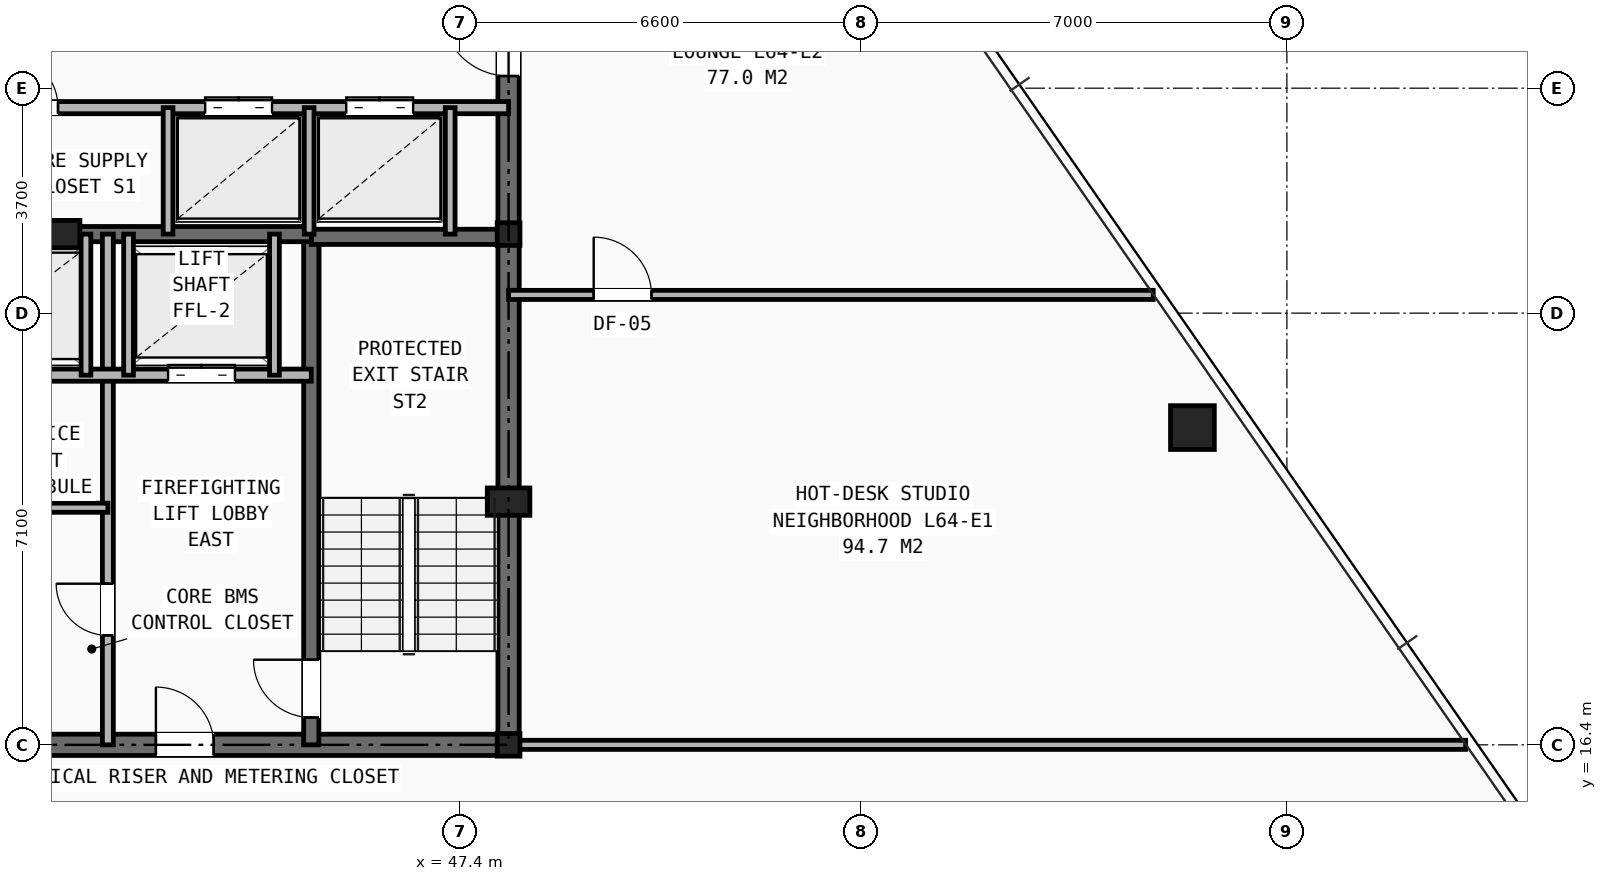
"""IFC4 building model, lengths in metres.
Left out: names, types, materials, properties, quantities, classifications, styles, units other than length and angle.
Written with IfcOpenShell. Run it as: python <this file> out.ifc"""

import sys

from ifc_helpers import new_model, si_unit, direction, frame, frame_2d, origin, origin_2d, place, context, subcontext, project, spatial, rectangle, hollow_rectangle, i_section, extrude, element, fill, save


model = new_model("IFC4")
c1 = context("Model", 3, precision=1e-05, world=origin(), true_north=direction((0.0, 1.0)))
c2 = subcontext(c1, "Body", "Model", "MODEL_VIEW")
j1 = project(units=[si_unit("LENGTHUNIT", "METRE"), si_unit("PLANEANGLEUNIT", "RADIAN")], contexts=[c1])
p1 = place(None, origin())
s1 = spatial("IfcSite", under=j1, at=p1, CompositionType="ELEMENT")
p2 = place(p1, origin())
s2 = spatial("IfcBuilding", under=s1, at=p2, CompositionType="ELEMENT")
p3 = place(p2, frame((0.0, 0.0, 225.9)))
s3 = spatial("IfcBuildingStorey", under=s2, at=p3, CompositionType="ELEMENT", Elevation=225.9)
for number, where, z_axis, x_axis in (
    (1, (48.2, 16.4, 0.0), (0.0, 0.0, 1.0), (1.0, 0.0, 0.0)),
    (2, (48.2, 24.8, 0.0), (0.0, 0.0, 1.0), (1.0, 0.0, 0.0)),
):
    element("IfcColumn", number, at=place(p3, frame(where, z_axis=z_axis, x_axis=x_axis)), inside=s3, PredefinedType="COLUMN", context=c2, shape_type="SweptSolid", body=[
        extrude(i_section(OverallWidth=0.374, OverallDepth=0.372, WebThickness=0.016, FlangeThickness=0.026, at=origin_2d()), origin(), (0.0, 0.0, 1.0), 3.5),
    ])
for number, where, z_axis, x_axis in (
    (3, (48.2, 20.4, 0.0), (0.0, 0.0, 1.0), (1.0, 0.0, 0.0)),
    (4, (40.8, 24.8, 0.0), (0.0, 0.0, 1.0), (1.0, 0.0, 0.0)),
):
    element("IfcColumn", number, at=place(p3, frame(where, z_axis=z_axis, x_axis=x_axis)), inside=s3, PredefinedType="PILASTER", context=c2, shape_type="SweptSolid", body=[
        extrude(rectangle(XDim=0.7, YDim=0.45, at=origin_2d()), origin(), (0.0, 0.0, 1.0), 3.5),
    ])
p4 = place(p3, frame((59.447, 21.618, 0.0), z_axis=(0.0, 0.0, 1.0), x_axis=(1.0, 0.0, 0.0)))
e5 = element("IfcColumn", 5, at=p4, inside=s3, PredefinedType="COLUMN", context=c2, shape_type="SweptSolid", body=[
    extrude(hollow_rectangle(XDim=0.72, YDim=0.72, WallThickness=0.05, at=origin_2d()), origin(), (0.0, 0.0, 1.0), 3.5),
])
p5 = place(p3, frame((31.8, 16.4, 0.0), z_axis=(0.0, 0.0, 1.0), x_axis=(1.0, 0.0, 0.0)))
e6 = element("IfcWall", 6, at=p5, inside=s3, PredefinedType="SHEAR", context=c2, shape_type="SweptSolid", body=[
    extrude(rectangle(XDim=16.4, YDim=0.35, at=frame_2d((8.2, 0.0))), origin(), (0.0, 0.0, 1.0), 3.25),
])
p6 = place(p5, frame((4.2, 0.0, 0.0)))
e7 = element("IfcOpeningElement", 7, at=p6, cuts=e6, PredefinedType="OPENING", context=c2, shape_type="SweptSolid", body=[
    extrude(rectangle(XDim=0.95, YDim=2.1, at=frame_2d((0.475, 1.05))), frame((0.0, 0.185, 0.0), z_axis=(0.0, -1.0, 0.0), x_axis=(1.0, 0.0, 0.0)), (0.0, 0.0, 1.0), 0.37),
])
p7 = place(p5, frame((10.6, 0.0, 0.0)))
e8 = element("IfcOpeningElement", 8, at=p7, cuts=e6, PredefinedType="OPENING", context=c2, shape_type="SweptSolid", body=[
    extrude(rectangle(XDim=0.95, YDim=2.1, at=frame_2d((0.475, 1.05))), frame((0.0, 0.185, 0.0), z_axis=(0.0, -1.0, 0.0), x_axis=(1.0, 0.0, 0.0)), (0.0, 0.0, 1.0), 0.37),
])
p8 = place(p3, frame((48.2, 16.4, 0.0), z_axis=(0.0, 0.0, 1.0), x_axis=(0.0, 1.0, 0.0)))
e9 = element("IfcWall", 9, at=p8, inside=s3, PredefinedType="SHEAR", context=c2, shape_type="SweptSolid", body=[
    extrude(rectangle(XDim=14.8, YDim=0.35, at=frame_2d((7.4, 0.0))), origin(), (0.0, 0.0, 1.0), 3.25),
])
p9 = place(p8, frame((11.0, 0.0, 0.0)))
e10 = element("IfcOpeningElement", 10, at=p9, cuts=e9, PredefinedType="OPENING", context=c2, shape_type="SweptSolid", body=[
    extrude(rectangle(XDim=1.1, YDim=2.15, at=frame_2d((0.55, 1.075))), frame((0.0, 0.185, 0.0), z_axis=(0.0, -1.0, 0.0), x_axis=(1.0, 0.0, 0.0)), (0.0, 0.0, 1.0), 0.37),
])
p10 = place(p3, frame((44.955, 16.4, 0.0), z_axis=(0.0, 0.0, 1.0), x_axis=(0.0, 1.0, 0.0)))
e11 = element("IfcWall", 11, at=p10, inside=s3, PredefinedType="SHEAR", context=c2, shape_type="SweptSolid", body=[
    extrude(rectangle(XDim=8.4, YDim=0.25, at=frame_2d((4.2, 0.0))), origin(), (0.0, 0.0, 1.0), 3.25),
])
p11 = place(p10, frame((0.45, 0.0, 0.0)))
e12 = element("IfcOpeningElement", 12, at=p11, cuts=e11, PredefinedType="OPENING", context=c2, shape_type="SweptSolid", body=[
    extrude(rectangle(XDim=0.95, YDim=2.1, at=frame_2d((0.475, 1.05))), frame((0.0, 0.135, 0.0), z_axis=(0.0, -1.0, 0.0), x_axis=(1.0, 0.0, 0.0)), (0.0, 0.0, 1.0), 0.27),
])
p12 = place(p3, frame((44.955, 24.755, 0.0), z_axis=(0.0, 0.0, 1.0), x_axis=(1.0, 0.0, 0.0)))
e13 = element("IfcWall", 13, at=p12, inside=s3, PredefinedType="SHEAR", context=c2, shape_type="SweptSolid", body=[
    extrude(rectangle(XDim=3.245, YDim=0.25, at=frame_2d((1.623, 0.0))), origin(), (0.0, 0.0, 1.0), 3.25),
])
p13 = place(p3, frame((35.045, 24.8, 0.0), z_axis=(0.0, 0.0, 1.0), x_axis=(1.0, 0.0, 0.0)))
e14 = element("IfcWall", 14, at=p13, inside=s3, PredefinedType="SHEAR", context=c2, shape_type="SweptSolid", body=[
    extrude(rectangle(XDim=9.91, YDim=0.25, at=frame_2d((4.955, 0.0))), origin(), (0.0, 0.0, 1.0), 3.25),
])
p14 = place(p3, frame((41.61, 16.4, 0.0), z_axis=(0.0, 0.0, 1.0), x_axis=(0.0, 1.0, 0.0)))
e15 = element("IfcWall", 15, at=p14, inside=s3, PredefinedType="PARTITIONING", context=c2, shape_type="SweptSolid", body=[
    extrude(rectangle(XDim=8.4, YDim=0.18, at=frame_2d((4.2, 0.0))), origin(), (0.0, 0.0, 1.0), 2.705),
])
p15 = place(p14, frame((1.8, 0.0, 0.0)))
e16 = element("IfcOpeningElement", 16, at=p15, cuts=e15, PredefinedType="OPENING", context=c2, shape_type="SweptSolid", body=[
    extrude(rectangle(XDim=0.85, YDim=2.05, at=frame_2d((0.425, 1.025))), frame((0.0, 0.1, 0.0), z_axis=(0.0, -1.0, 0.0), x_axis=(1.0, 0.0, 0.0)), (0.0, 0.0, 1.0), 0.2),
])
p16 = place(p3, frame((35.045, 22.48, 0.0), z_axis=(0.0, 0.0, 1.0), x_axis=(1.0, 0.0, 0.0)))
e17 = element("IfcWall", 17, at=p16, inside=s3, PredefinedType="SOLIDWALL", context=c2, shape_type="SweptSolid", body=[
    extrude(rectangle(XDim=9.91, YDim=0.2, at=frame_2d((4.955, 0.0))), origin(), (0.0, 0.0, 1.0), 3.25),
])
p17 = place(p16, frame((1.255, 0.0, 0.0)))
e18 = element("IfcOpeningElement", 18, at=p17, cuts=e17, PredefinedType="OPENING", context=c2, shape_type="SweptSolid", body=[
    extrude(rectangle(XDim=1.1, YDim=2.15, at=frame_2d((0.55, 1.075))), frame((0.0, 0.11, 0.0), z_axis=(0.0, -1.0, 0.0), x_axis=(1.0, 0.0, 0.0)), (0.0, 0.0, 1.0), 0.22),
])
p18 = place(p16, frame((7.555, 0.0, 0.0)))
e19 = element("IfcOpeningElement", 19, at=p18, cuts=e17, PredefinedType="OPENING", context=c2, shape_type="SweptSolid", body=[
    extrude(rectangle(XDim=1.1, YDim=2.15, at=frame_2d((0.55, 1.075))), frame((0.0, 0.11, 0.0), z_axis=(0.0, -1.0, 0.0), x_axis=(1.0, 0.0, 0.0)), (0.0, 0.0, 1.0), 0.22),
])
p19 = place(p16, frame((4.405, 0.0, 0.0)))
e20 = element("IfcOpeningElement", 20, at=p19, cuts=e17, PredefinedType="OPENING", context=c2, shape_type="SweptSolid", body=[
    extrude(rectangle(XDim=1.1, YDim=2.15, at=frame_2d((0.55, 1.075))), frame((0.0, 0.11, 0.0), z_axis=(0.0, -1.0, 0.0), x_axis=(1.0, 0.0, 0.0)), (0.0, 0.0, 1.0), 0.22),
])
p20 = place(p3, frame((38.39, 20.3, 0.0), z_axis=(0.0, 0.0, 1.0), x_axis=(1.0, 0.0, 0.0)))
e21 = element("IfcWall", 21, at=p20, inside=s3, PredefinedType="PARTITIONING", context=c2, shape_type="SweptSolid", body=[
    extrude(rectangle(XDim=3.22, YDim=0.15, at=frame_2d((1.61, 0.0))), origin(), (0.0, 0.0, 1.0), 3.25),
])
for number, where, z_axis, x_axis in (
    (22, (41.95, 22.48, 0.0), (0.0, 0.0, 1.0), (0.0, 1.0, 0.0)),
    (23, (44.35, 22.48, 0.0), (0.0, 0.0, 1.0), (0.0, 1.0, 0.0)),
    (24, (41.25, 22.48, 0.0), (0.0, 0.0, 1.0), (0.0, 1.0, 0.0)),
):
    element("IfcWall", number, at=place(p3, frame(where, z_axis=z_axis, x_axis=x_axis)), inside=s3, PredefinedType="SOLIDWALL", context=c2, shape_type="SweptSolid", body=[
        extrude(rectangle(XDim=2.32, YDim=0.16, at=frame_2d((1.16, 0.0))), origin(), (0.0, 0.0, 1.0), 3.25),
    ])
p21 = place(p3, frame((33.82, 26.88, 0.0), z_axis=(0.0, 0.0, 1.0), x_axis=(1.0, 0.0, 0.0)))
e25 = element("IfcWall", 25, at=p21, inside=s3, PredefinedType="SOLIDWALL", context=c2, shape_type="SweptSolid", body=[
    extrude(rectangle(XDim=14.38, YDim=0.2, at=frame_2d((7.19, 0.0))), origin(), (0.0, 0.0, 1.0), 2.705),
])
p22 = place(p21, frame((1.78, 0.0, 0.0)))
e26 = element("IfcOpeningElement", 26, at=p22, cuts=e25, PredefinedType="OPENING", context=c2, shape_type="SweptSolid", body=[
    extrude(rectangle(XDim=0.9, YDim=2.1, at=frame_2d((0.45, 1.05))), frame((0.0, 0.11, 0.0), z_axis=(0.0, -1.0, 0.0), x_axis=(1.0, 0.0, 0.0)), (0.0, 0.0, 1.0), 0.22),
])
p23 = place(p21, frame((6.07, 0.0, 0.0)))
e27 = element("IfcOpeningElement", 27, at=p23, cuts=e25, PredefinedType="OPENING", context=c2, shape_type="SweptSolid", body=[
    extrude(rectangle(XDim=0.9, YDim=2.1, at=frame_2d((0.45, 1.05))), frame((0.0, 0.11, 0.0), z_axis=(0.0, -1.0, 0.0), x_axis=(1.0, 0.0, 0.0)), (0.0, 0.0, 1.0), 0.22),
])
p24 = place(p21, frame((9.39, 0.0, 0.0)))
e28 = element("IfcOpeningElement", 28, at=p24, cuts=e25, PredefinedType="OPENING", context=c2, shape_type="SweptSolid", body=[
    extrude(rectangle(XDim=1.1, YDim=2.15, at=frame_2d((0.55, 1.075))), frame((0.0, 0.11, 0.0), z_axis=(0.0, -1.0, 0.0), x_axis=(1.0, 0.0, 0.0)), (0.0, 0.0, 1.0), 0.22),
])
p25 = place(p21, frame((11.71, 0.0, 0.0)))
e29 = element("IfcOpeningElement", 29, at=p25, cuts=e25, PredefinedType="OPENING", context=c2, shape_type="SweptSolid", body=[
    extrude(rectangle(XDim=1.1, YDim=2.15, at=frame_2d((0.55, 1.075))), frame((0.0, 0.11, 0.0), z_axis=(0.0, -1.0, 0.0), x_axis=(1.0, 0.0, 0.0)), (0.0, 0.0, 1.0), 0.22),
])
for number, where, z_axis, x_axis in (
    (30, (42.6, 24.8, 0.0), (0.0, 0.0, 1.0), (0.0, 1.0, 0.0)),
    (31, (44.92, 24.8, 0.0), (0.0, 0.0, 1.0), (0.0, 1.0, 0.0)),
    (32, (47.24, 24.8, 0.0), (0.0, 0.0, 1.0), (0.0, 1.0, 0.0)),
):
    element("IfcWall", number, at=place(p3, frame(where, z_axis=z_axis, x_axis=x_axis)), inside=s3, PredefinedType="SOLIDWALL", context=c2, shape_type="SweptSolid", body=[
        extrude(rectangle(XDim=2.08, YDim=0.16, at=frame_2d((1.04, 0.0))), origin(), (0.0, 0.0, 1.0), 3.25),
    ])
p26 = place(p3, frame((48.2, 16.4, 0.0), z_axis=(0.0, 0.0, 1.0), x_axis=(1.0, 0.0, 0.0)))
e33 = element("IfcWall", 33, at=p26, inside=s3, PredefinedType="PARTITIONING", context=c2, shape_type="SweptSolid", body=[
    extrude(rectangle(XDim=15.74, YDim=0.15, at=frame_2d((7.87, 0.0))), origin(), (0.0, 0.0, 1.0), 2.292),
])
p27 = place(p3, frame((48.2, 23.8, 0.0), z_axis=(0.0, 0.0, 1.0), x_axis=(1.0, 0.0, 0.0)))
e34 = element("IfcWall", 34, at=p27, inside=s3, PredefinedType="PARTITIONING", context=c2, shape_type="SweptSolid", body=[
    extrude(rectangle(XDim=10.602, YDim=0.15, at=frame_2d((5.301, 0.0))), origin(), (0.0, 0.0, 1.0), 2.628),
])
p28 = place(p27, frame((1.4, 0.0, 0.0)))
e35 = element("IfcOpeningElement", 35, at=p28, cuts=e34, PredefinedType="OPENING", context=c2, shape_type="SweptSolid", body=[
    extrude(rectangle(XDim=0.95, YDim=2.1, at=frame_2d((0.475, 1.05))), frame((0.0, 0.085, 0.0), z_axis=(0.0, -1.0, 0.0), x_axis=(1.0, 0.0, 0.0)), (0.0, 0.0, 1.0), 0.17),
])
p29 = place(p15, origin())
e36 = element("IfcDoor", 36, at=p29, inside=s3, OperationType="SINGLE_SWING_RIGHT", PredefinedType="DOOR", context=c2, shape_type="SweptSolid", body=[
    extrude(rectangle(XDim=0.85, YDim=2.05, at=frame_2d((0.425, 1.025))), frame((0.0, 0.025, 0.0), z_axis=(0.0, -1.0, 0.0), x_axis=(1.0, 0.0, 0.0)), (0.0, 0.0, 1.0), 0.05),
])
fill(e16, e36)
p30 = place(p11, origin())
e37 = element("IfcDoor", 37, at=p30, inside=s3, OperationType="SINGLE_SWING_RIGHT", PredefinedType="DOOR", context=c2, shape_type="SweptSolid", body=[
    extrude(rectangle(XDim=0.95, YDim=2.1, at=frame_2d((0.475, 1.05))), frame((0.0, 0.025, 0.0), z_axis=(0.0, -1.0, 0.0), x_axis=(1.0, 0.0, 0.0)), (0.0, 0.0, 1.0), 0.05),
])
fill(e12, e37)
p31 = place(p7, origin())
e38 = element("IfcDoor", 38, at=p31, inside=s3, OperationType="SINGLE_SWING_LEFT", PredefinedType="DOOR", context=c2, shape_type="SweptSolid", body=[
    extrude(rectangle(XDim=0.95, YDim=2.1, at=frame_2d((0.475, 1.05))), frame((0.0, 0.025, 0.0), z_axis=(0.0, -1.0, 0.0), x_axis=(1.0, 0.0, 0.0)), (0.0, 0.0, 1.0), 0.05),
])
fill(e8, e38)
p32 = place(p18, origin())
e39 = element("IfcDoor", 39, at=p32, inside=s3, OperationType="DOUBLE_DOOR_SLIDING", PredefinedType="DOOR", context=c2, shape_type="SweptSolid", body=[
    extrude(rectangle(XDim=1.1, YDim=2.15, at=frame_2d((0.55, 1.075))), frame((0.0, 0.025, 0.0), z_axis=(0.0, -1.0, 0.0), x_axis=(1.0, 0.0, 0.0)), (0.0, 0.0, 1.0), 0.05),
])
fill(e19, e39)
p33 = place(p9, origin())
e40 = element("IfcDoor", 40, at=p33, inside=s3, OperationType="SINGLE_SWING_RIGHT", PredefinedType="DOOR", context=c2, shape_type="SweptSolid", body=[
    extrude(rectangle(XDim=1.1, YDim=2.15, at=frame_2d((0.55, 1.075))), frame((0.0, 0.025, 0.0), z_axis=(0.0, -1.0, 0.0), x_axis=(1.0, 0.0, 0.0)), (0.0, 0.0, 1.0), 0.05),
])
fill(e10, e40)
p34 = place(p23, origin())
e41 = element("IfcDoor", 41, at=p34, inside=s3, OperationType="SINGLE_SWING_LEFT", PredefinedType="DOOR", context=c2, shape_type="SweptSolid", body=[
    extrude(rectangle(XDim=0.9, YDim=2.1, at=frame_2d((0.45, 1.05))), frame((0.0, 0.025, 0.0), z_axis=(0.0, -1.0, 0.0), x_axis=(1.0, 0.0, 0.0)), (0.0, 0.0, 1.0), 0.05),
])
fill(e27, e41)
p35 = place(p24, origin())
e42 = element("IfcDoor", 42, at=p35, inside=s3, OperationType="DOUBLE_DOOR_SLIDING", PredefinedType="DOOR", context=c2, shape_type="SweptSolid", body=[
    extrude(rectangle(XDim=1.1, YDim=2.15, at=frame_2d((0.55, 1.075))), frame((0.0, 0.025, 0.0), z_axis=(0.0, -1.0, 0.0), x_axis=(1.0, 0.0, 0.0)), (0.0, 0.0, 1.0), 0.05),
])
fill(e28, e42)
p36 = place(p25, origin())
e43 = element("IfcDoor", 43, at=p36, inside=s3, OperationType="DOUBLE_DOOR_SLIDING", PredefinedType="DOOR", context=c2, shape_type="SweptSolid", body=[
    extrude(rectangle(XDim=1.1, YDim=2.15, at=frame_2d((0.55, 1.075))), frame((0.0, 0.025, 0.0), z_axis=(0.0, -1.0, 0.0), x_axis=(1.0, 0.0, 0.0)), (0.0, 0.0, 1.0), 0.05),
])
fill(e29, e43)
p37 = place(p28, origin())
e44 = element("IfcDoor", 44, at=p37, inside=s3, OperationType="SINGLE_SWING_LEFT", PredefinedType="DOOR", context=c2, shape_type="SweptSolid", body=[
    extrude(rectangle(XDim=0.95, YDim=2.1, at=frame_2d((0.475, 1.05))), frame((0.0, 0.025, 0.0), z_axis=(0.0, -1.0, 0.0), x_axis=(1.0, 0.0, 0.0)), (0.0, 0.0, 1.0), 0.05),
])
fill(e35, e44)
save(model, sys.argv[1])
